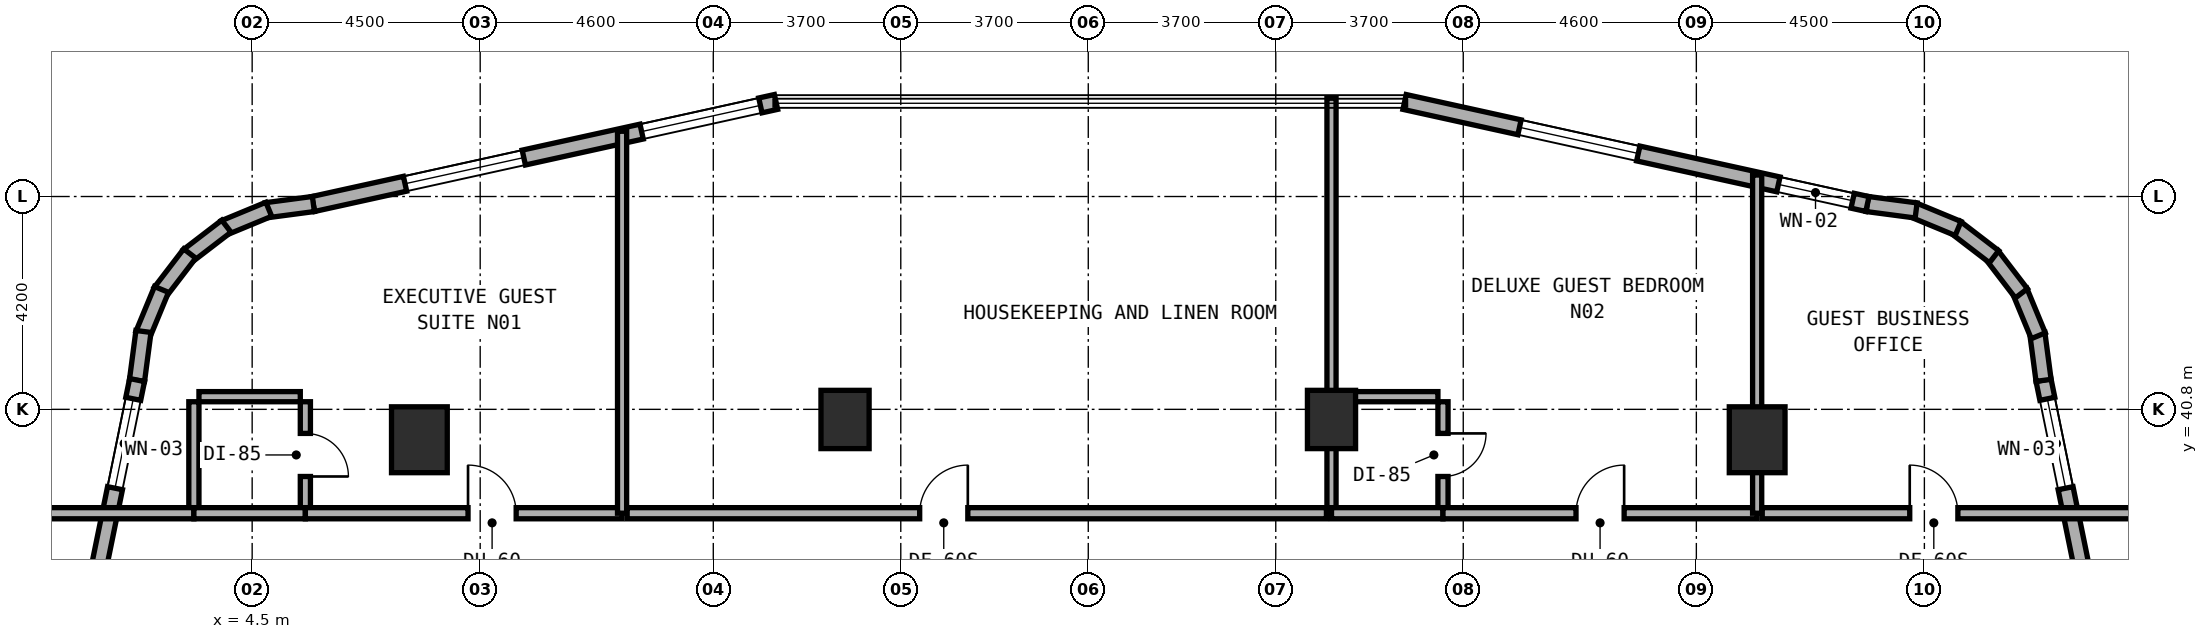
"""IFC4 building model, lengths in metres.
Left out: names, types, materials, properties, quantities, classifications, styles, units other than length and angle.
Written with IfcOpenShell. Run it as: python <this file> out.ifc"""

import sys

from ifc_helpers import new_model, si_unit, direction, frame, frame_2d, origin, origin_2d, place, context, subcontext, project, spatial, rectangle, extrude, element, fill, save


model = new_model("IFC4")
c1 = context("Model", 3, precision=1e-05, world=origin(), true_north=direction((0.0, 1.0)))
c2 = subcontext(c1, "Body", "Model", "MODEL_VIEW")
j1 = project(units=[si_unit("LENGTHUNIT", "METRE"), si_unit("PLANEANGLEUNIT", "RADIAN")], contexts=[c1])
p1 = place(None, origin())
s1 = spatial("IfcSite", under=j1, at=p1, CompositionType="ELEMENT")
p2 = place(p1, origin())
s2 = spatial("IfcBuilding", under=s1, at=p2, CompositionType="ELEMENT")
p3 = place(p2, frame((0.0, 0.0, 45.0)))
s3 = spatial("IfcBuildingStorey", under=s2, at=p3, CompositionType="ELEMENT", Elevation=45.0)
for number, where, z_axis, x_axis in (
    (1, (16.2, 40.6, 0.0), (0.0, 0.0, 1.0), (1.0, 0.0, 0.0)),
    (2, (25.8, 40.6, 0.0), (0.0, 0.0, 1.0), (1.0, 0.0, 0.0)),
):
    element("IfcColumn", number, at=place(p3, frame(where, z_axis=z_axis, x_axis=x_axis)), inside=s3, PredefinedType="COLUMN", context=c2, shape_type="SweptSolid", body=[
        extrude(rectangle(XDim=0.95, YDim=1.15, at=origin_2d()), origin(), (0.0, 0.0, 1.0), 3.5),
    ])
for number, where, z_axis, x_axis in (
    (3, (34.2, 40.2, 0.0), (0.0, 0.0, 1.0), (1.0, 0.0, 0.0)),
    (4, (7.8, 40.2, 0.0), (0.0, 0.0, 1.0), (1.0, 0.0, 0.0)),
):
    element("IfcColumn", number, at=place(p3, frame(where, z_axis=z_axis, x_axis=x_axis)), inside=s3, PredefinedType="COLUMN", context=c2, shape_type="SweptSolid", body=[
        extrude(rectangle(XDim=1.1, YDim=1.3, at=origin_2d()), origin(), (0.0, 0.0, 1.0), 3.5),
    ])
p4 = place(p3, frame((41.864, 31.516, 0.0), z_axis=(0.0, 0.0, 1.0), x_axis=(-0.199990901713, 0.979797754249, 0.0)))
e5 = element("IfcWall", 5, at=p4, inside=s3, PredefinedType="STANDARD", context=c2, shape_type="SweptSolid", body=[
    extrude(rectangle(XDim=10.065, YDim=0.3, at=frame_2d((5.033, 0.0))), origin(), (0.0, 0.0, 1.0), 3.22),
])
p5 = place(p4, frame((2.429, 0.0, 0.8)))
e6 = element("IfcOpeningElement", 6, at=p5, cuts=e5, PredefinedType="OPENING", context=c2, shape_type="SweptSolid", body=[
    extrude(rectangle(XDim=2.4, YDim=1.6, at=frame_2d((1.2, 0.8))), frame((0.0, 0.16, 0.0), z_axis=(0.0, -1.0, 0.0), x_axis=(1.0, 0.0, 0.0)), (0.0, 0.0, 1.0), 0.32),
])
p6 = place(p4, frame((7.887, 0.0, 0.85)))
e7 = element("IfcOpeningElement", 7, at=p6, cuts=e5, PredefinedType="OPENING", context=c2, shape_type="SweptSolid", body=[
    extrude(rectangle(XDim=1.8, YDim=1.5, at=frame_2d((0.9, 0.75))), frame((0.0, 0.16, 0.0), z_axis=(0.0, -1.0, 0.0), x_axis=(1.0, 0.0, 0.0)), (0.0, 0.0, 1.0), 0.32),
])
p7 = place(p3, frame((39.852, 41.372, 0.0), z_axis=(0.0, 0.0, 1.0), x_axis=(-0.131174864804, 0.991359246108, 0.0)))
e8 = element("IfcWall", 8, at=p7, inside=s3, PredefinedType="STANDARD", context=c2, shape_type="SweptSolid", body=[
    extrude(rectangle(XDim=0.938, YDim=0.3, at=frame_2d((0.469, 0.0))), origin(), (0.0, 0.0, 1.0), 3.22),
])
p8 = place(p3, frame((39.748, 42.252, 0.0), z_axis=(0.0, 0.0, 1.0), x_axis=(-0.382344263057, 0.924019948111, 0.0)))
e9 = element("IfcWall", 9, at=p8, inside=s3, PredefinedType="STANDARD", context=c2, shape_type="SweptSolid", body=[
    extrude(rectangle(XDim=0.955, YDim=0.3, at=frame_2d((0.477, 0.0))), origin(), (0.0, 0.0, 1.0), 3.22),
])
p9 = place(p3, frame((39.414, 43.089, 0.0), z_axis=(0.0, 0.0, 1.0), x_axis=(-0.608474481025, 0.793573440799, 0.0)))
e10 = element("IfcWall", 10, at=p9, inside=s3, PredefinedType="STANDARD", context=c2, shape_type="SweptSolid", body=[
    extrude(rectangle(XDim=0.955, YDim=0.3, at=frame_2d((0.478, 0.0))), origin(), (0.0, 0.0, 1.0), 3.22),
])
p10 = place(p3, frame((38.875, 43.812, 0.0), z_axis=(0.0, 0.0, 1.0), x_axis=(-0.793668068435, 0.608351047625, 0.0)))
e11 = element("IfcWall", 11, at=p10, inside=s3, PredefinedType="STANDARD", context=c2, shape_type="SweptSolid", body=[
    extrude(rectangle(XDim=0.955, YDim=0.3, at=frame_2d((0.478, 0.0))), origin(), (0.0, 0.0, 1.0), 3.22),
])
p11 = place(p3, frame((38.166, 44.369, 0.0), z_axis=(0.0, 0.0, 1.0), x_axis=(-0.924019948111, 0.382344263057, 0.0)))
e12 = element("IfcWall", 12, at=p11, inside=s3, PredefinedType="STANDARD", context=c2, shape_type="SweptSolid", body=[
    extrude(rectangle(XDim=0.955, YDim=0.3, at=frame_2d((0.477, 0.0))), origin(), (0.0, 0.0, 1.0), 3.22),
])
p12 = place(p3, frame((37.337, 44.725, 0.0), z_axis=(0.0, 0.0, 1.0), x_axis=(-0.991454295543, 0.130454512571, 0.0)))
e13 = element("IfcWall", 13, at=p12, inside=s3, PredefinedType="STANDARD", context=c2, shape_type="SweptSolid", body=[
    extrude(rectangle(XDim=0.973, YDim=0.3, at=frame_2d((0.487, 0.0))), origin(), (0.0, 0.0, 1.0), 3.22),
])
p13 = place(p3, frame((36.376, 44.852, 0.0), z_axis=(0.0, 0.0, 1.0), x_axis=(-0.97654500432, 0.215313386808, 0.0)))
e14 = element("IfcWall", 14, at=p13, inside=s3, PredefinedType="STANDARD", context=c2, shape_type="SweptSolid", body=[
    extrude(rectangle(XDim=9.354, YDim=0.3, at=frame_2d((4.677, 0.0))), origin(), (0.0, 0.0, 1.0), 3.22),
])
p14 = place(p13, frame((0.299, 0.0, 0.85)))
e15 = element("IfcOpeningElement", 15, at=p14, cuts=e14, PredefinedType="OPENING", context=c2, shape_type="SweptSolid", body=[
    extrude(rectangle(XDim=1.5, YDim=1.5, at=frame_2d((0.75, 0.75))), frame((0.0, 0.16, 0.0), z_axis=(0.0, -1.0, 0.0), x_axis=(1.0, 0.0, 0.0)), (0.0, 0.0, 1.0), 0.32),
])
p15 = place(p13, frame((4.631, 0.0, 0.8)))
e16 = element("IfcOpeningElement", 16, at=p15, cuts=e14, PredefinedType="OPENING", context=c2, shape_type="SweptSolid", body=[
    extrude(rectangle(XDim=2.4, YDim=1.6, at=frame_2d((1.2, 0.8))), frame((0.0, 0.16, 0.0), z_axis=(0.0, -1.0, 0.0), x_axis=(1.0, 0.0, 0.0)), (0.0, 0.0, 1.0), 0.32),
])
p16 = place(p3, frame((14.838, 46.866, 0.0), z_axis=(0.0, 0.0, 1.0), x_axis=(-0.9765437942, -0.215318875183, 0.0)))
e17 = element("IfcWall", 17, at=p16, inside=s3, PredefinedType="STANDARD", context=c2, shape_type="SweptSolid", body=[
    extrude(rectangle(XDim=9.353, YDim=0.3, at=frame_2d((4.677, 0.0))), origin(), (0.0, 0.0, 1.0), 3.22),
])
p17 = place(p16, frame((0.316, 0.0, 0.8)))
e18 = element("IfcOpeningElement", 18, at=p17, cuts=e17, PredefinedType="OPENING", context=c2, shape_type="SweptSolid", body=[
    extrude(rectangle(XDim=2.4, YDim=1.6, at=frame_2d((1.2, 0.8))), frame((0.0, 0.16, 0.0), z_axis=(0.0, -1.0, 0.0), x_axis=(1.0, 0.0, 0.0)), (0.0, 0.0, 1.0), 0.32),
])
p18 = place(p16, frame((5.097, 0.0, 0.8)))
e19 = element("IfcOpeningElement", 19, at=p18, cuts=e17, PredefinedType="OPENING", context=c2, shape_type="SweptSolid", body=[
    extrude(rectangle(XDim=2.4, YDim=1.6, at=frame_2d((1.2, 0.8))), frame((0.0, 0.16, 0.0), z_axis=(0.0, -1.0, 0.0), x_axis=(1.0, 0.0, 0.0)), (0.0, 0.0, 1.0), 0.32),
])
p19 = place(p3, frame((5.708, 44.852, 0.0), z_axis=(0.0, 0.0, 1.0), x_axis=(-0.991359246108, -0.131174864804, 0.0)))
e20 = element("IfcWall", 20, at=p19, inside=s3, PredefinedType="STANDARD", context=c2, shape_type="SweptSolid", body=[
    extrude(rectangle(XDim=0.938, YDim=0.3, at=frame_2d((0.469, 0.0))), origin(), (0.0, 0.0, 1.0), 3.22),
])
p20 = place(p3, frame((4.828, 44.748, 0.0), z_axis=(0.0, 0.0, 1.0), x_axis=(-0.923982547689, -0.382434636986, 0.0)))
e21 = element("IfcWall", 21, at=p20, inside=s3, PredefinedType="STANDARD", context=c2, shape_type="SweptSolid", body=[
    extrude(rectangle(XDim=0.954, YDim=0.3, at=frame_2d((0.477, 0.0))), origin(), (0.0, 0.0, 1.0), 3.22),
])
for number, where, z_axis, x_axis in (
    (22, (3.991, 44.414, 0.0), (0.0, 0.0, 1.0), (-0.794, -0.608, 0.0)),
    (23, (3.268, 43.875, 0.0), (0.0, 0.0, 1.0), (-0.608, -0.794, 0.0)),
):
    element("IfcWall", number, at=place(p3, frame(where, z_axis=z_axis, x_axis=x_axis)), inside=s3, PredefinedType="STANDARD", context=c2, shape_type="SweptSolid", body=[
        extrude(rectangle(XDim=0.955, YDim=0.3, at=frame_2d((0.478, 0.0))), origin(), (0.0, 0.0, 1.0), 3.22),
    ])
p21 = place(p3, frame((2.711, 43.166, 0.0), z_axis=(0.0, 0.0, 1.0), x_axis=(-0.382344263057, -0.924019948111, 0.0)))
e24 = element("IfcWall", 24, at=p21, inside=s3, PredefinedType="STANDARD", context=c2, shape_type="SweptSolid", body=[
    extrude(rectangle(XDim=0.955, YDim=0.3, at=frame_2d((0.477, 0.0))), origin(), (0.0, 0.0, 1.0), 3.22),
])
p22 = place(p3, frame((2.355, 42.337, 0.0), z_axis=(0.0, 0.0, 1.0), x_axis=(-0.130454512571, -0.991454295543, 0.0)))
e25 = element("IfcWall", 25, at=p22, inside=s3, PredefinedType="STANDARD", context=c2, shape_type="SweptSolid", body=[
    extrude(rectangle(XDim=0.973, YDim=0.3, at=frame_2d((0.487, 0.0))), origin(), (0.0, 0.0, 1.0), 3.22),
])
p23 = place(p3, frame((2.229, 41.378, 0.0), z_axis=(0.0, 0.0, 1.0), x_axis=(-0.199990901713, -0.979797754249, 0.0)))
e26 = element("IfcWall", 26, at=p23, inside=s3, PredefinedType="STANDARD", context=c2, shape_type="SweptSolid", body=[
    extrude(rectangle(XDim=10.065, YDim=0.3, at=frame_2d((5.033, 0.0))), origin(), (0.0, 0.0, 1.0), 3.22),
])
p24 = place(p23, frame((0.378, 0.0, 0.85)))
e27 = element("IfcOpeningElement", 27, at=p24, cuts=e26, PredefinedType="OPENING", context=c2, shape_type="SweptSolid", body=[
    extrude(rectangle(XDim=1.8, YDim=1.5, at=frame_2d((0.9, 0.75))), frame((0.0, 0.16, 0.0), z_axis=(0.0, -1.0, 0.0), x_axis=(1.0, 0.0, 0.0)), (0.0, 0.0, 1.0), 0.32),
])
p25 = place(p23, frame((5.236, 0.0, 0.8)))
e28 = element("IfcOpeningElement", 28, at=p25, cuts=e26, PredefinedType="OPENING", context=c2, shape_type="SweptSolid", body=[
    extrude(rectangle(XDim=2.4, YDim=1.6, at=frame_2d((1.2, 0.8))), frame((0.0, 0.16, 0.0), z_axis=(0.0, -1.0, 0.0), x_axis=(1.0, 0.0, 0.0)), (0.0, 0.0, 1.0), 0.32),
])
p26 = place(p3, frame((5.55, 38.85, 0.0), z_axis=(0.0, 0.0, 1.0), x_axis=(0.0, 1.0, 0.0)))
e29 = element("IfcWall", 29, at=p26, inside=s3, PredefinedType="PLUMBINGWALL", context=c2, shape_type="SweptSolid", body=[
    extrude(rectangle(XDim=2.1, YDim=0.2, at=frame_2d((1.05, 0.0))), origin(), (0.0, 0.0, 1.0), 3.22),
])
p27 = place(p26, frame((0.625, 0.0, 0.0)))
e30 = element("IfcOpeningElement", 30, at=p27, cuts=e29, PredefinedType="OPENING", context=c2, shape_type="SweptSolid", body=[
    extrude(rectangle(XDim=0.85, YDim=2.1, at=frame_2d((0.425, 1.05))), frame((0.0, 0.11, 0.0), z_axis=(0.0, -1.0, 0.0), x_axis=(1.0, 0.0, 0.0)), (0.0, 0.0, 1.0), 0.22),
])
p28 = place(p3, frame((3.45, 41.05, 0.0), z_axis=(0.0, 0.0, 1.0), x_axis=(1.0, 0.0, 0.0)))
e31 = element("IfcWall", 31, at=p28, inside=s3, PredefinedType="PLUMBINGWALL", context=c2, shape_type="SweptSolid", body=[
    extrude(rectangle(XDim=2.0, YDim=0.2, at=frame_2d((1.0, 0.0))), origin(), (0.0, 0.0, 1.0), 3.22),
])
p29 = place(p3, frame((3.35, 38.85, 0.0), z_axis=(0.0, 0.0, 1.0), x_axis=(0.0, 1.0, 0.0)))
e32 = element("IfcWall", 32, at=p29, inside=s3, PredefinedType="PLUMBINGWALL", context=c2, shape_type="SweptSolid", body=[
    extrude(rectangle(XDim=2.1, YDim=0.2, at=frame_2d((1.05, 0.0))), origin(), (0.0, 0.0, 1.0), 3.22),
])
p30 = place(p3, frame((0.24, 38.75, 0.0), z_axis=(0.0, 0.0, 1.0), x_axis=(1.0, 0.0, 0.0)))
e33 = element("IfcWall", 33, at=p30, inside=s3, PredefinedType="SOLIDWALL", context=c2, shape_type="SweptSolid", body=[
    extrude(rectangle(XDim=3.11, YDim=0.22, at=frame_2d((1.555, 0.0))), origin(), (0.0, 0.0, 1.0), 3.22),
])
p31 = place(p3, frame((3.35, 38.75, 0.0), z_axis=(0.0, 0.0, 1.0), x_axis=(1.0, 0.0, 0.0)))
e34 = element("IfcWall", 34, at=p31, inside=s3, PredefinedType="SOLIDWALL", context=c2, shape_type="SweptSolid", body=[
    extrude(rectangle(XDim=2.2, YDim=0.22, at=frame_2d((1.1, 0.0))), origin(), (0.0, 0.0, 1.0), 3.22),
])
p32 = place(p3, frame((5.55, 38.75, 0.0), z_axis=(0.0, 0.0, 1.0), x_axis=(1.0, 0.0, 0.0)))
e35 = element("IfcWall", 35, at=p32, inside=s3, PredefinedType="SOLIDWALL", context=c2, shape_type="SweptSolid", body=[
    extrude(rectangle(XDim=6.25, YDim=0.22, at=frame_2d((3.125, 0.0))), origin(), (0.0, 0.0, 1.0), 2.395),
])
p33 = place(p32, frame((3.21, 0.0, 0.0)))
e36 = element("IfcOpeningElement", 36, at=p33, cuts=e35, PredefinedType="OPENING", context=c2, shape_type="SweptSolid", body=[
    extrude(rectangle(XDim=0.95, YDim=2.1, at=frame_2d((0.475, 1.05))), frame((0.0, 0.12, 0.0), z_axis=(0.0, -1.0, 0.0), x_axis=(1.0, 0.0, 0.0)), (0.0, 0.0, 1.0), 0.24),
])
p34 = place(p3, frame((11.8, 38.75, 0.0), z_axis=(0.0, 0.0, 1.0), x_axis=(0.0, 1.0, 0.0)))
e37 = element("IfcWall", 37, at=p34, inside=s3, PredefinedType="SOLIDWALL", context=c2, shape_type="SweptSolid", body=[
    extrude(rectangle(XDim=7.538, YDim=0.18, at=frame_2d((3.769, 0.0))), origin(), (0.0, 0.0, 1.0), 2.745),
])
p35 = place(p3, frame((11.9, 38.75, 0.0), z_axis=(0.0, 0.0, 1.0), x_axis=(1.0, 0.0, 0.0)))
e38 = element("IfcWall", 38, at=p35, inside=s3, PredefinedType="SOLIDWALL", context=c2, shape_type="SweptSolid", body=[
    extrude(rectangle(XDim=13.8, YDim=0.22, at=frame_2d((6.9, 0.0))), origin(), (0.0, 0.0, 1.0), 2.395),
])
p36 = place(p35, frame((5.773, 0.0, 0.0)))
e39 = element("IfcOpeningElement", 39, at=p36, cuts=e38, PredefinedType="OPENING", context=c2, shape_type="SweptSolid", body=[
    extrude(rectangle(XDim=0.95, YDim=2.1, at=frame_2d((0.475, 1.05))), frame((0.0, 0.12, 0.0), z_axis=(0.0, -1.0, 0.0), x_axis=(1.0, 0.0, 0.0)), (0.0, 0.0, 1.0), 0.24),
])
p37 = place(p3, frame((25.8, 38.75, 0.0), z_axis=(0.0, 0.0, 1.0), x_axis=(0.0, 1.0, 0.0)))
e40 = element("IfcWall", 40, at=p37, inside=s3, PredefinedType="SOLIDWALL", context=c2, shape_type="SweptSolid", body=[
    extrude(rectangle(XDim=8.19, YDim=0.18, at=frame_2d((4.095, 0.0))), origin(), (0.0, 0.0, 1.0), 2.395),
])
p38 = place(p3, frame((28.0, 38.85, 0.0), z_axis=(0.0, 0.0, 1.0), x_axis=(0.0, 1.0, 0.0)))
e41 = element("IfcWall", 41, at=p38, inside=s3, PredefinedType="PLUMBINGWALL", context=c2, shape_type="SweptSolid", body=[
    extrude(rectangle(XDim=2.1, YDim=0.2, at=frame_2d((1.05, 0.0))), origin(), (0.0, 0.0, 1.0), 2.745),
])
p39 = place(p38, frame((0.625, 0.0, 0.0)))
e42 = element("IfcOpeningElement", 42, at=p39, cuts=e41, PredefinedType="OPENING", context=c2, shape_type="SweptSolid", body=[
    extrude(rectangle(XDim=0.85, YDim=2.1, at=frame_2d((0.425, 1.05))), frame((0.0, 0.11, 0.0), z_axis=(0.0, -1.0, 0.0), x_axis=(1.0, 0.0, 0.0)), (0.0, 0.0, 1.0), 0.22),
])
p40 = place(p3, frame((25.9, 41.05, 0.0), z_axis=(0.0, 0.0, 1.0), x_axis=(1.0, 0.0, 0.0)))
e43 = element("IfcWall", 43, at=p40, inside=s3, PredefinedType="PLUMBINGWALL", context=c2, shape_type="SweptSolid", body=[
    extrude(rectangle(XDim=2.0, YDim=0.2, at=frame_2d((1.0, 0.0))), origin(), (0.0, 0.0, 1.0), 3.22),
])
p41 = place(p3, frame((25.8, 38.75, 0.0), z_axis=(0.0, 0.0, 1.0), x_axis=(1.0, 0.0, 0.0)))
e44 = element("IfcWall", 44, at=p41, inside=s3, PredefinedType="SOLIDWALL", context=c2, shape_type="SweptSolid", body=[
    extrude(rectangle(XDim=2.2, YDim=0.22, at=frame_2d((1.1, 0.0))), origin(), (0.0, 0.0, 1.0), 2.395),
])
p42 = place(p3, frame((28.0, 38.75, 0.0), z_axis=(0.0, 0.0, 1.0), x_axis=(1.0, 0.0, 0.0)))
e45 = element("IfcWall", 45, at=p42, inside=s3, PredefinedType="SOLIDWALL", context=c2, shape_type="SweptSolid", body=[
    extrude(rectangle(XDim=6.2, YDim=0.22, at=frame_2d((3.1, 0.0))), origin(), (0.0, 0.0, 1.0), 2.395),
])
p43 = place(p42, frame((2.625, 0.0, 0.0)))
e46 = element("IfcOpeningElement", 46, at=p43, cuts=e45, PredefinedType="OPENING", context=c2, shape_type="SweptSolid", body=[
    extrude(rectangle(XDim=0.95, YDim=2.1, at=frame_2d((0.475, 1.05))), frame((0.0, 0.12, 0.0), z_axis=(0.0, -1.0, 0.0), x_axis=(1.0, 0.0, 0.0)), (0.0, 0.0, 1.0), 0.24),
])
p44 = place(p3, frame((34.2, 38.75, 0.0), z_axis=(0.0, 0.0, 1.0), x_axis=(0.0, 1.0, 0.0)))
e47 = element("IfcWall", 47, at=p44, inside=s3, PredefinedType="SOLIDWALL", context=c2, shape_type="SweptSolid", body=[
    extrude(rectangle(XDim=6.674, YDim=0.18, at=frame_2d((3.337, 0.0))), origin(), (0.0, 0.0, 1.0), 2.395),
])
p45 = place(p3, frame((34.3, 38.75, 0.0), z_axis=(0.0, 0.0, 1.0), x_axis=(1.0, 0.0, 0.0)))
e48 = element("IfcWall", 48, at=p45, inside=s3, PredefinedType="SOLIDWALL", context=c2, shape_type="SweptSolid", body=[
    extrude(rectangle(XDim=7.44, YDim=0.22, at=frame_2d((3.72, 0.0))), origin(), (0.0, 0.0, 1.0), 2.745),
])
p46 = place(p45, frame((2.911, 0.0, 0.0)))
e49 = element("IfcOpeningElement", 49, at=p46, cuts=e48, PredefinedType="OPENING", context=c2, shape_type="SweptSolid", body=[
    extrude(rectangle(XDim=0.95, YDim=2.1, at=frame_2d((0.475, 1.05))), frame((0.0, 0.12, 0.0), z_axis=(0.0, -1.0, 0.0), x_axis=(1.0, 0.0, 0.0)), (0.0, 0.0, 1.0), 0.24),
])
p47 = place(p6, origin())
e50 = element("IfcWindow", 50, at=p47, inside=s3, PartitioningType="SINGLE_PANEL", PredefinedType="WINDOW", context=c2, shape_type="SweptSolid", body=[
    extrude(rectangle(XDim=1.8, YDim=1.5, at=frame_2d((0.9, 0.75))), frame((0.0, 0.03, 0.0), z_axis=(0.0, -1.0, 0.0), x_axis=(1.0, 0.0, 0.0)), (0.0, 0.0, 1.0), 0.06),
])
fill(e7, e50)
p48 = place(p14, origin())
e51 = element("IfcWindow", 51, at=p48, inside=s3, PartitioningType="SINGLE_PANEL", PredefinedType="WINDOW", context=c2, shape_type="SweptSolid", body=[
    extrude(rectangle(XDim=1.5, YDim=1.5, at=frame_2d((0.75, 0.75))), frame((0.0, 0.03, 0.0), z_axis=(0.0, -1.0, 0.0), x_axis=(1.0, 0.0, 0.0)), (0.0, 0.0, 1.0), 0.06),
])
fill(e15, e51)
p49 = place(p15, origin())
e52 = element("IfcWindow", 52, at=p49, inside=s3, PartitioningType="SINGLE_PANEL", PredefinedType="WINDOW", context=c2, shape_type="SweptSolid", body=[
    extrude(rectangle(XDim=2.4, YDim=1.6, at=frame_2d((1.2, 0.8))), frame((0.0, 0.03, 0.0), z_axis=(0.0, -1.0, 0.0), x_axis=(1.0, 0.0, 0.0)), (0.0, 0.0, 1.0), 0.06),
])
fill(e16, e52)
p50 = place(p17, origin())
e53 = element("IfcWindow", 53, at=p50, inside=s3, PartitioningType="SINGLE_PANEL", PredefinedType="WINDOW", context=c2, shape_type="SweptSolid", body=[
    extrude(rectangle(XDim=2.4, YDim=1.6, at=frame_2d((1.2, 0.8))), frame((0.0, 0.03, 0.0), z_axis=(0.0, -1.0, 0.0), x_axis=(1.0, 0.0, 0.0)), (0.0, 0.0, 1.0), 0.06),
])
fill(e18, e53)
p51 = place(p18, origin())
e54 = element("IfcWindow", 54, at=p51, inside=s3, PartitioningType="SINGLE_PANEL", PredefinedType="WINDOW", context=c2, shape_type="SweptSolid", body=[
    extrude(rectangle(XDim=2.4, YDim=1.6, at=frame_2d((1.2, 0.8))), frame((0.0, 0.03, 0.0), z_axis=(0.0, -1.0, 0.0), x_axis=(1.0, 0.0, 0.0)), (0.0, 0.0, 1.0), 0.06),
])
fill(e19, e54)
p52 = place(p24, origin())
e55 = element("IfcWindow", 55, at=p52, inside=s3, PartitioningType="SINGLE_PANEL", PredefinedType="WINDOW", context=c2, shape_type="SweptSolid", body=[
    extrude(rectangle(XDim=1.8, YDim=1.5, at=frame_2d((0.9, 0.75))), frame((0.0, 0.03, 0.0), z_axis=(0.0, -1.0, 0.0), x_axis=(1.0, 0.0, 0.0)), (0.0, 0.0, 1.0), 0.06),
])
fill(e27, e55)
p53 = place(p27, frame((0.85, 0.0, 0.0), z_axis=(0.0, 0.0, 1.0), x_axis=(-1.0, 0.0, 0.0)))
e56 = element("IfcDoor", 56, at=p53, inside=s3, OperationType="SINGLE_SWING_RIGHT", PredefinedType="DOOR", context=c2, shape_type="SweptSolid", body=[
    extrude(rectangle(XDim=0.85, YDim=2.1, at=frame_2d((0.425, 1.05))), frame((0.0, 0.025, 0.0), z_axis=(0.0, -1.0, 0.0), x_axis=(1.0, 0.0, 0.0)), (0.0, 0.0, 1.0), 0.05),
])
fill(e30, e56)
p54 = place(p33, origin())
e57 = element("IfcDoor", 57, at=p54, inside=s3, OperationType="SINGLE_SWING_LEFT", PredefinedType="DOOR", context=c2, shape_type="SweptSolid", body=[
    extrude(rectangle(XDim=0.95, YDim=2.1, at=frame_2d((0.475, 1.05))), frame((0.0, 0.025, 0.0), z_axis=(0.0, -1.0, 0.0), x_axis=(1.0, 0.0, 0.0)), (0.0, 0.0, 1.0), 0.05),
])
fill(e36, e57)
p55 = place(p36, origin())
e58 = element("IfcDoor", 58, at=p55, inside=s3, OperationType="SINGLE_SWING_RIGHT", PredefinedType="DOOR", context=c2, shape_type="SweptSolid", body=[
    extrude(rectangle(XDim=0.95, YDim=2.1, at=frame_2d((0.475, 1.05))), frame((0.0, 0.025, 0.0), z_axis=(0.0, -1.0, 0.0), x_axis=(1.0, 0.0, 0.0)), (0.0, 0.0, 1.0), 0.05),
])
fill(e39, e58)
p56 = place(p39, frame((0.85, 0.0, 0.0), z_axis=(0.0, 0.0, 1.0), x_axis=(-1.0, 0.0, 0.0)))
e59 = element("IfcDoor", 59, at=p56, inside=s3, OperationType="SINGLE_SWING_LEFT", PredefinedType="DOOR", context=c2, shape_type="SweptSolid", body=[
    extrude(rectangle(XDim=0.85, YDim=2.1, at=frame_2d((0.425, 1.05))), frame((0.0, 0.025, 0.0), z_axis=(0.0, -1.0, 0.0), x_axis=(1.0, 0.0, 0.0)), (0.0, 0.0, 1.0), 0.05),
])
fill(e42, e59)
p57 = place(p43, origin())
e60 = element("IfcDoor", 60, at=p57, inside=s3, OperationType="SINGLE_SWING_RIGHT", PredefinedType="DOOR", context=c2, shape_type="SweptSolid", body=[
    extrude(rectangle(XDim=0.95, YDim=2.1, at=frame_2d((0.475, 1.05))), frame((0.0, 0.025, 0.0), z_axis=(0.0, -1.0, 0.0), x_axis=(1.0, 0.0, 0.0)), (0.0, 0.0, 1.0), 0.05),
])
fill(e46, e60)
p58 = place(p46, origin())
e61 = element("IfcDoor", 61, at=p58, inside=s3, OperationType="SINGLE_SWING_LEFT", PredefinedType="DOOR", context=c2, shape_type="SweptSolid", body=[
    extrude(rectangle(XDim=0.95, YDim=2.1, at=frame_2d((0.475, 1.05))), frame((0.0, 0.025, 0.0), z_axis=(0.0, -1.0, 0.0), x_axis=(1.0, 0.0, 0.0)), (0.0, 0.0, 1.0), 0.05),
])
fill(e49, e61)
save(model, sys.argv[1])
